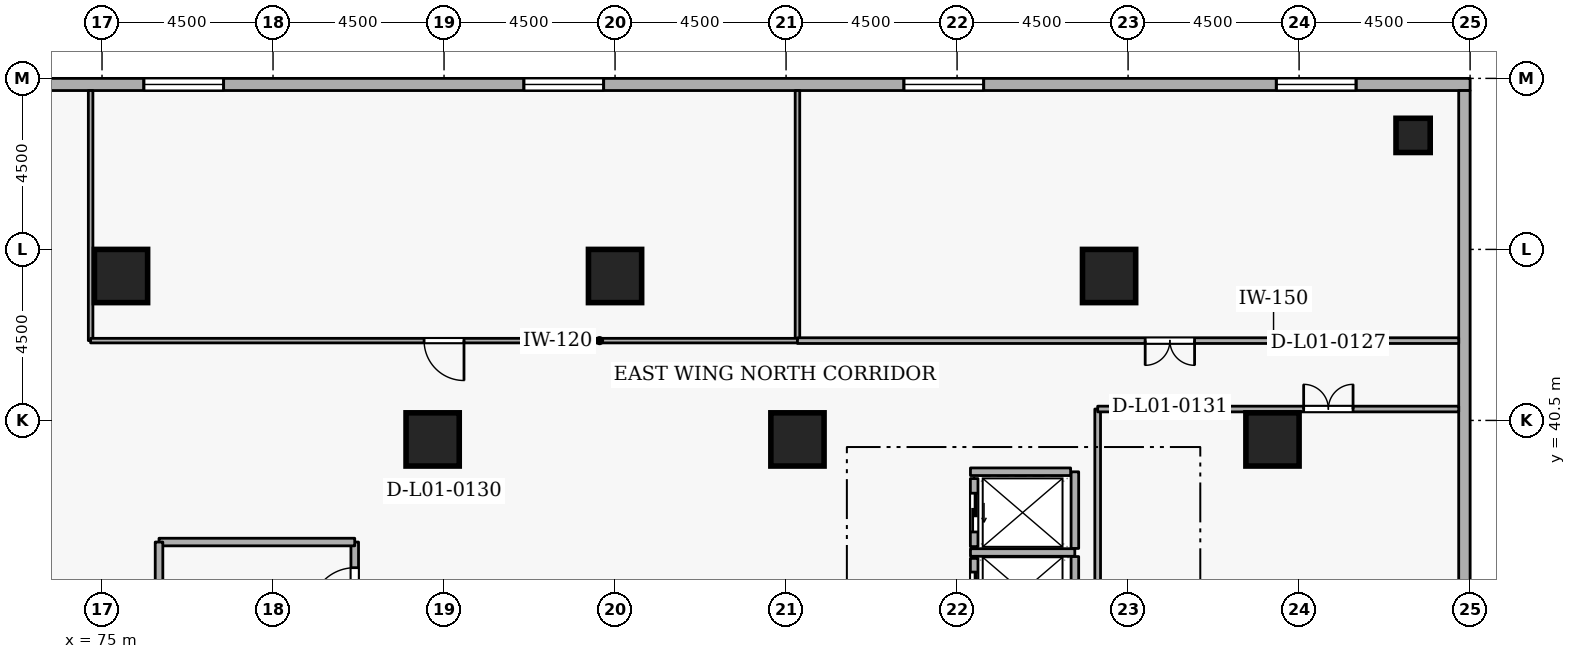
"""IFC4 building model, lengths in metres.
Left out: names, types, materials, properties, quantities, classifications, styles, units other than length and angle.
Written with IfcOpenShell. Run it as: python <this file> out.ifc"""

import sys

from ifc_helpers import new_model, si_unit, direction, frame, frame_2d, origin, origin_2d, place, context, subcontext, project, spatial, rectangle, extrude, element, fill, save


model = new_model("IFC4")
c1 = context("Model", 3, precision=1e-05, world=origin(), true_north=direction((0.0, 1.0)))
c2 = subcontext(c1, "Body", "Model", "MODEL_VIEW")
j1 = project(units=[si_unit("LENGTHUNIT", "METRE"), si_unit("PLANEANGLEUNIT", "RADIAN")], contexts=[c1])
p1 = place(None, origin())
s1 = spatial("IfcSite", under=j1, at=p1, CompositionType="ELEMENT")
p2 = place(p1, origin())
s2 = spatial("IfcBuilding", under=s1, at=p2, CompositionType="ELEMENT")
p3 = place(p2, frame((0.0, 0.0, 4.8)))
s3 = spatial("IfcBuildingStorey", under=s2, at=p3, CompositionType="ELEMENT", Elevation=4.8)
for number, where, z_axis, x_axis in (
    (1, (105.8, 40.0, 0.0), (0.0, 0.0, 1.0), (1.0, 0.0, 0.0)),
    (2, (101.5, 44.3, 0.0), (0.0, 0.0, 1.0), (1.0, 0.0, 0.0)),
    (3, (88.5, 44.3, 0.0), (0.0, 0.0, 1.0), (1.0, 0.0, 0.0)),
    (4, (75.5, 44.3, 0.0), (0.0, 0.0, 1.0), (1.0, 0.0, 0.0)),
    (5, (93.3, 40.0, 0.0), (0.0, 0.0, 1.0), (1.0, 0.0, 0.0)),
    (6, (83.7, 40.0, 0.0), (0.0, 0.0, 1.0), (1.0, 0.0, 0.0)),
):
    element("IfcColumn", number, at=place(p3, frame(where, z_axis=z_axis, x_axis=x_axis)), inside=s3, PredefinedType="COLUMN", context=c2, shape_type="SweptSolid", body=[
        extrude(rectangle(XDim=1.4, YDim=1.4, at=origin_2d()), origin(), (0.0, 0.0, 1.0), 4.8),
    ])
p4 = place(p3, frame((109.5, 48.0, 0.0), z_axis=(0.0, 0.0, 1.0), x_axis=(1.0, 0.0, 0.0)))
e7 = element("IfcColumn", 7, at=p4, inside=s3, PredefinedType="COLUMN", context=c2, shape_type="SweptSolid", body=[
    extrude(rectangle(XDim=0.9, YDim=0.9, at=origin_2d()), origin(), (0.0, 0.0, 1.0), 4.8),
])
p5 = place(p3, frame((111.0, 49.34, 0.0), z_axis=(0.0, 0.0, 1.0), x_axis=(-1.0, 0.0, 0.0)))
e8 = element("IfcWall", 8, at=p5, inside=s3, PredefinedType="STANDARD", context=c2, shape_type="SweptSolid", body=[
    extrude(rectangle(XDim=39.4, YDim=0.32, at=frame_2d((19.7, 0.0))), origin(), (0.0, 0.0, 1.0), 3.86),
])
p6 = place(p5, frame((3.0, 0.0, 0.78)))
e9 = element("IfcOpeningElement", 9, at=p6, cuts=e8, PredefinedType="OPENING", context=c2, shape_type="SweptSolid", body=[
    extrude(rectangle(XDim=2.1, YDim=2.4, at=frame_2d((1.05, 1.2))), frame((0.0, 0.17, 0.0), z_axis=(0.0, -1.0, 0.0), x_axis=(1.0, 0.0, 0.0)), (0.0, 0.0, 1.0), 0.34),
])
p7 = place(p5, frame((12.8, 0.0, 0.78)))
e10 = element("IfcOpeningElement", 10, at=p7, cuts=e8, PredefinedType="OPENING", context=c2, shape_type="SweptSolid", body=[
    extrude(rectangle(XDim=2.1, YDim=2.4, at=frame_2d((1.05, 1.2))), frame((0.0, 0.17, 0.0), z_axis=(0.0, -1.0, 0.0), x_axis=(1.0, 0.0, 0.0)), (0.0, 0.0, 1.0), 0.34),
])
p8 = place(p5, frame((22.8, 0.0, 0.78)))
e11 = element("IfcOpeningElement", 11, at=p8, cuts=e8, PredefinedType="OPENING", context=c2, shape_type="SweptSolid", body=[
    extrude(rectangle(XDim=2.1, YDim=2.4, at=frame_2d((1.05, 1.2))), frame((0.0, 0.17, 0.0), z_axis=(0.0, -1.0, 0.0), x_axis=(1.0, 0.0, 0.0)), (0.0, 0.0, 1.0), 0.34),
])
p9 = place(p5, frame((32.8, 0.0, 0.78)))
e12 = element("IfcOpeningElement", 12, at=p9, cuts=e8, PredefinedType="OPENING", context=c2, shape_type="SweptSolid", body=[
    extrude(rectangle(XDim=2.1, YDim=2.4, at=frame_2d((1.05, 1.2))), frame((0.0, 0.17, 0.0), z_axis=(0.0, -1.0, 0.0), x_axis=(1.0, 0.0, 0.0)), (0.0, 0.0, 1.0), 0.34),
])
p10 = place(p3, frame((110.85, 6.32, 0.0), z_axis=(0.0, 0.0, 1.0), x_axis=(0.0, 1.0, 0.0)))
e13 = element("IfcWall", 13, at=p10, inside=s3, PredefinedType="STANDARD", context=c2, shape_type="SweptSolid", body=[
    extrude(rectangle(XDim=42.86, YDim=0.3, at=frame_2d((21.43, 0.0))), origin(), (0.0, 0.0, 1.0), 3.86),
])
p11 = place(p3, frame((97.95, 36.87, 0.0), z_axis=(0.0, 0.0, 1.0), x_axis=(0.0, -1.0, 0.0)))
e14 = element("IfcWall", 14, at=p11, inside=s3, PredefinedType="STANDARD", context=c2, shape_type="SweptSolid", body=[
    extrude(rectangle(XDim=1.74, YDim=0.2, at=frame_2d((0.87, 0.0))), origin(), (0.0, 0.0, 1.0), 4.46),
])
p12 = place(p11, frame((0.36, 0.0, 0.0)))
e15 = element("IfcOpeningElement", 15, at=p12, cuts=e14, PredefinedType="OPENING", context=c2, shape_type="SweptSolid", body=[
    extrude(rectangle(XDim=1.02, YDim=2.06, at=frame_2d((0.51, 1.03))), frame((0.0, 0.11, 0.0), z_axis=(0.0, -1.0, 0.0), x_axis=(1.0, 0.0, 0.0)), (0.0, 0.0, 1.0), 0.22),
])
p13 = place(p3, frame((97.95, 38.97, 0.0), z_axis=(0.0, 0.0, 1.0), x_axis=(0.0, -1.0, 0.0)))
e16 = element("IfcWall", 16, at=p13, inside=s3, PredefinedType="STANDARD", context=c2, shape_type="SweptSolid", body=[
    extrude(rectangle(XDim=1.79, YDim=0.2, at=frame_2d((0.895, 0.0))), origin(), (0.0, 0.0, 1.0), 4.46),
])
p14 = place(p13, frame((0.385, 0.0, 0.0)))
e17 = element("IfcOpeningElement", 17, at=p14, cuts=e16, PredefinedType="OPENING", context=c2, shape_type="SweptSolid", body=[
    extrude(rectangle(XDim=1.02, YDim=2.06, at=frame_2d((0.51, 1.03))), frame((0.0, 0.11, 0.0), z_axis=(0.0, -1.0, 0.0), x_axis=(1.0, 0.0, 0.0)), (0.0, 0.0, 1.0), 0.22),
])
p15 = place(p3, frame((97.852, 37.025, 0.0), z_axis=(0.0, 0.0, 1.0), x_axis=(1.0, 0.0, 0.0)))
e18 = element("IfcWall", 18, at=p15, inside=s3, PredefinedType="STANDARD", context=c2, shape_type="SweptSolid", body=[
    extrude(rectangle(XDim=2.746, YDim=0.2, at=frame_2d((1.373, 0.0))), origin(), (0.0, 0.0, 1.0), 4.46),
])
p16 = place(p3, frame((100.6, 35.062, 0.0), z_axis=(0.0, 0.0, 1.0), x_axis=(0.0, 1.0, 0.0)))
e19 = element("IfcWall", 19, at=p16, inside=s3, PredefinedType="STANDARD", context=c2, shape_type="SweptSolid", body=[
    extrude(rectangle(XDim=1.856, YDim=0.2, at=frame_2d((0.928, 0.0))), origin(), (0.0, 0.0, 1.0), 4.46),
])
p17 = place(p3, frame((100.6, 37.132, 0.0), z_axis=(0.0, 0.0, 1.0), x_axis=(0.0, 1.0, 0.0)))
e20 = element("IfcWall", 20, at=p17, inside=s3, PredefinedType="STANDARD", context=c2, shape_type="SweptSolid", body=[
    extrude(rectangle(XDim=2.016, YDim=0.2, at=frame_2d((1.008, 0.0))), origin(), (0.0, 0.0, 1.0), 4.46),
])
p18 = place(p3, frame((97.852, 39.15, 0.0), z_axis=(0.0, 0.0, 1.0), x_axis=(1.0, 0.0, 0.0)))
e21 = element("IfcWall", 21, at=p18, inside=s3, PredefinedType="STANDARD", context=c2, shape_type="SweptSolid", body=[
    extrude(rectangle(XDim=2.636, YDim=0.2, at=frame_2d((1.318, 0.0))), origin(), (0.0, 0.0, 1.0), 4.46),
])
p19 = place(p3, frame((81.65, 34.8, 0.0), z_axis=(0.0, 0.0, 1.0), x_axis=(0.0, 1.0, 0.0)))
e22 = element("IfcWall", 22, at=p19, inside=s3, PredefinedType="STANDARD", context=c2, shape_type="SweptSolid", body=[
    extrude(rectangle(XDim=2.5, YDim=0.2, at=frame_2d((1.25, 0.0))), origin(), (0.0, 0.0, 1.0), 4.46),
])
p20 = place(p19, frame((0.675, 0.0, 0.0)))
e23 = element("IfcOpeningElement", 23, at=p20, cuts=e22, PredefinedType="OPENING", context=c2, shape_type="SweptSolid", body=[
    extrude(rectangle(XDim=1.15, YDim=2.1, at=frame_2d((0.575, 1.05))), frame((0.0, 0.11, 0.0), z_axis=(0.0, -1.0, 0.0), x_axis=(1.0, 0.0, 0.0)), (0.0, 0.0, 1.0), 0.22),
])
p21 = place(p3, frame((81.65, 37.3, 0.0), z_axis=(0.0, 0.0, 1.0), x_axis=(-1.0, 0.0, 0.0)))
e24 = element("IfcWall", 24, at=p21, inside=s3, PredefinedType="STANDARD", context=c2, shape_type="SweptSolid", body=[
    extrude(rectangle(XDim=5.15, YDim=0.2, at=frame_2d((2.575, 0.0))), origin(), (0.0, 0.0, 1.0), 4.46),
])
p22 = place(p3, frame((76.5, 37.3, 0.0), z_axis=(0.0, 0.0, 1.0), x_axis=(0.0, -1.0, 0.0)))
e25 = element("IfcWall", 25, at=p22, inside=s3, PredefinedType="STANDARD", context=c2, shape_type="SweptSolid", body=[
    extrude(rectangle(XDim=2.5, YDim=0.2, at=frame_2d((1.25, 0.0))), origin(), (0.0, 0.0, 1.0), 4.46),
])
p23 = place(p3, frame((101.2, 16.65, 0.0), z_axis=(0.0, 0.0, 1.0), x_axis=(0.0, 1.0, 0.0)))
e26 = element("IfcWall", 26, at=p23, inside=s3, PredefinedType="PARTITIONING", context=c2, shape_type="SweptSolid", body=[
    extrude(rectangle(XDim=24.15, YDim=0.15, at=frame_2d((12.075, 0.0))), origin(), (0.0, 0.0, 1.0), 4.46),
])
p24 = place(p3, frame((101.2, 40.8, 0.0), z_axis=(0.0, 0.0, 1.0), x_axis=(1.0, 0.0, 0.0)))
e27 = element("IfcWall", 27, at=p24, inside=s3, PredefinedType="PARTITIONING", context=c2, shape_type="SweptSolid", body=[
    extrude(rectangle(XDim=9.5, YDim=0.15, at=frame_2d((4.75, 0.0))), origin(), (0.0, 0.0, 1.0), 4.46),
])
p25 = place(p24, frame((5.42, 0.0, 0.0)))
e28 = element("IfcOpeningElement", 28, at=p25, cuts=e27, PredefinedType="OPENING", context=c2, shape_type="SweptSolid", body=[
    extrude(rectangle(XDim=1.3, YDim=2.12, at=frame_2d((0.65, 1.06))), frame((0.0, 0.085, 0.0), z_axis=(0.0, -1.0, 0.0), x_axis=(1.0, 0.0, 0.0)), (0.0, 0.0, 1.0), 0.17),
])
for number, where, z_axis, x_axis in (
    (29, (74.7, 42.6, 0.0), (0.0, 0.0, 1.0), (0.0, 1.0, 0.0)),
    (30, (93.3, 49.18, 0.0), (0.0, 0.0, 1.0), (0.0, -1.0, 0.0)),
):
    element("IfcWall", number, at=place(p3, frame(where, z_axis=z_axis, x_axis=x_axis)), inside=s3, PredefinedType="PARTITIONING", context=c2, shape_type="SweptSolid", body=[
        extrude(rectangle(XDim=6.58, YDim=0.12, at=frame_2d((3.29, 0.0))), origin(), (0.0, 0.0, 1.0), 4.46),
    ])
p26 = place(p3, frame((93.3, 42.6, 0.0), z_axis=(0.0, 0.0, 1.0), x_axis=(-1.0, 0.0, 0.0)))
e31 = element("IfcWall", 31, at=p26, inside=s3, PredefinedType="PARTITIONING", context=c2, shape_type="SweptSolid", body=[
    extrude(rectangle(XDim=18.6, YDim=0.12, at=frame_2d((9.3, 0.0))), origin(), (0.0, 0.0, 1.0), 4.46),
])
p27 = place(p26, frame((8.775, 0.0, 0.0)))
e32 = element("IfcOpeningElement", 32, at=p27, cuts=e31, PredefinedType="OPENING", context=c2, shape_type="SweptSolid", body=[
    extrude(rectangle(XDim=1.05, YDim=2.1, at=frame_2d((0.525, 1.05))), frame((0.0, 0.07, 0.0), z_axis=(0.0, -1.0, 0.0), x_axis=(1.0, 0.0, 0.0)), (0.0, 0.0, 1.0), 0.14),
])
p28 = place(p3, frame((110.7, 42.6, 0.0), z_axis=(0.0, 0.0, 1.0), x_axis=(-1.0, 0.0, 0.0)))
e33 = element("IfcWall", 33, at=p28, inside=s3, PredefinedType="PARTITIONING", context=c2, shape_type="SweptSolid", body=[
    extrude(rectangle(XDim=17.4, YDim=0.15, at=frame_2d((8.7, 0.0))), origin(), (0.0, 0.0, 1.0), 4.46),
])
p29 = place(p28, frame((6.95, 0.0, 0.0)))
e34 = element("IfcOpeningElement", 34, at=p29, cuts=e33, PredefinedType="OPENING", context=c2, shape_type="SweptSolid", body=[
    extrude(rectangle(XDim=1.3, YDim=2.12, at=frame_2d((0.65, 1.06))), frame((0.0, 0.085, 0.0), z_axis=(0.0, -1.0, 0.0), x_axis=(1.0, 0.0, 0.0)), (0.0, 0.0, 1.0), 0.17),
])
p30 = place(p6, origin())
e35 = element("IfcWindow", 35, at=p30, inside=s3, PartitioningType="SINGLE_PANEL", PredefinedType="WINDOW", context=c2, shape_type="SweptSolid", body=[
    extrude(rectangle(XDim=2.1, YDim=2.4, at=frame_2d((1.05, 1.2))), frame((0.0, 0.03, 0.0), z_axis=(0.0, -1.0, 0.0), x_axis=(1.0, 0.0, 0.0)), (0.0, 0.0, 1.0), 0.06),
])
fill(e9, e35)
p31 = place(p7, origin())
e36 = element("IfcWindow", 36, at=p31, inside=s3, PartitioningType="SINGLE_PANEL", PredefinedType="WINDOW", context=c2, shape_type="SweptSolid", body=[
    extrude(rectangle(XDim=2.1, YDim=2.4, at=frame_2d((1.05, 1.2))), frame((0.0, 0.03, 0.0), z_axis=(0.0, -1.0, 0.0), x_axis=(1.0, 0.0, 0.0)), (0.0, 0.0, 1.0), 0.06),
])
fill(e10, e36)
p32 = place(p8, origin())
e37 = element("IfcWindow", 37, at=p32, inside=s3, PartitioningType="SINGLE_PANEL", PredefinedType="WINDOW", context=c2, shape_type="SweptSolid", body=[
    extrude(rectangle(XDim=2.1, YDim=2.4, at=frame_2d((1.05, 1.2))), frame((0.0, 0.03, 0.0), z_axis=(0.0, -1.0, 0.0), x_axis=(1.0, 0.0, 0.0)), (0.0, 0.0, 1.0), 0.06),
])
fill(e11, e37)
p33 = place(p9, origin())
e38 = element("IfcWindow", 38, at=p33, inside=s3, PartitioningType="SINGLE_PANEL", PredefinedType="WINDOW", context=c2, shape_type="SweptSolid", body=[
    extrude(rectangle(XDim=2.1, YDim=2.4, at=frame_2d((1.05, 1.2))), frame((0.0, 0.03, 0.0), z_axis=(0.0, -1.0, 0.0), x_axis=(1.0, 0.0, 0.0)), (0.0, 0.0, 1.0), 0.06),
])
fill(e12, e38)
p34 = place(p12, origin())
e39 = element("IfcDoor", 39, at=p34, inside=s3, OperationType="SLIDING_TO_LEFT", PredefinedType="DOOR", context=c2, shape_type="SweptSolid", body=[
    extrude(rectangle(XDim=1.02, YDim=2.06, at=frame_2d((0.51, 1.03))), frame((0.0, 0.025, 0.0), z_axis=(0.0, -1.0, 0.0), x_axis=(1.0, 0.0, 0.0)), (0.0, 0.0, 1.0), 0.05),
])
fill(e15, e39)
p35 = place(p14, origin())
e40 = element("IfcDoor", 40, at=p35, inside=s3, OperationType="SLIDING_TO_LEFT", PredefinedType="DOOR", context=c2, shape_type="SweptSolid", body=[
    extrude(rectangle(XDim=1.02, YDim=2.06, at=frame_2d((0.51, 1.03))), frame((0.0, 0.025, 0.0), z_axis=(0.0, -1.0, 0.0), x_axis=(1.0, 0.0, 0.0)), (0.0, 0.0, 1.0), 0.05),
])
fill(e17, e40)
p36 = place(p20, origin())
e41 = element("IfcDoor", 41, at=p36, inside=s3, OperationType="SINGLE_SWING_LEFT", PredefinedType="DOOR", context=c2, shape_type="SweptSolid", body=[
    extrude(rectangle(XDim=1.15, YDim=2.1, at=frame_2d((0.575, 1.05))), frame((0.0, 0.025, 0.0), z_axis=(0.0, -1.0, 0.0), x_axis=(1.0, 0.0, 0.0)), (0.0, 0.0, 1.0), 0.05),
])
fill(e23, e41)
p37 = place(p25, origin())
e42 = element("IfcDoor", 42, at=p37, inside=s3, OperationType="DOUBLE_DOOR_SINGLE_SWING", PredefinedType="DOOR", context=c2, shape_type="SweptSolid", body=[
    extrude(rectangle(XDim=1.3, YDim=2.12, at=frame_2d((0.65, 1.06))), frame((0.0, 0.025, 0.0), z_axis=(0.0, -1.0, 0.0), x_axis=(1.0, 0.0, 0.0)), (0.0, 0.0, 1.0), 0.05),
])
fill(e28, e42)
p38 = place(p27, origin())
e43 = element("IfcDoor", 43, at=p38, inside=s3, OperationType="SINGLE_SWING_LEFT", PredefinedType="DOOR", context=c2, shape_type="SweptSolid", body=[
    extrude(rectangle(XDim=1.05, YDim=2.1, at=frame_2d((0.525, 1.05))), frame((0.0, 0.025, 0.0), z_axis=(0.0, -1.0, 0.0), x_axis=(1.0, 0.0, 0.0)), (0.0, 0.0, 1.0), 0.05),
])
fill(e32, e43)
p39 = place(p29, origin())
e44 = element("IfcDoor", 44, at=p39, inside=s3, OperationType="DOUBLE_DOOR_SINGLE_SWING", PredefinedType="DOOR", context=c2, shape_type="SweptSolid", body=[
    extrude(rectangle(XDim=1.3, YDim=2.12, at=frame_2d((0.65, 1.06))), frame((0.0, 0.025, 0.0), z_axis=(0.0, -1.0, 0.0), x_axis=(1.0, 0.0, 0.0)), (0.0, 0.0, 1.0), 0.05),
])
fill(e34, e44)
save(model, sys.argv[1])
